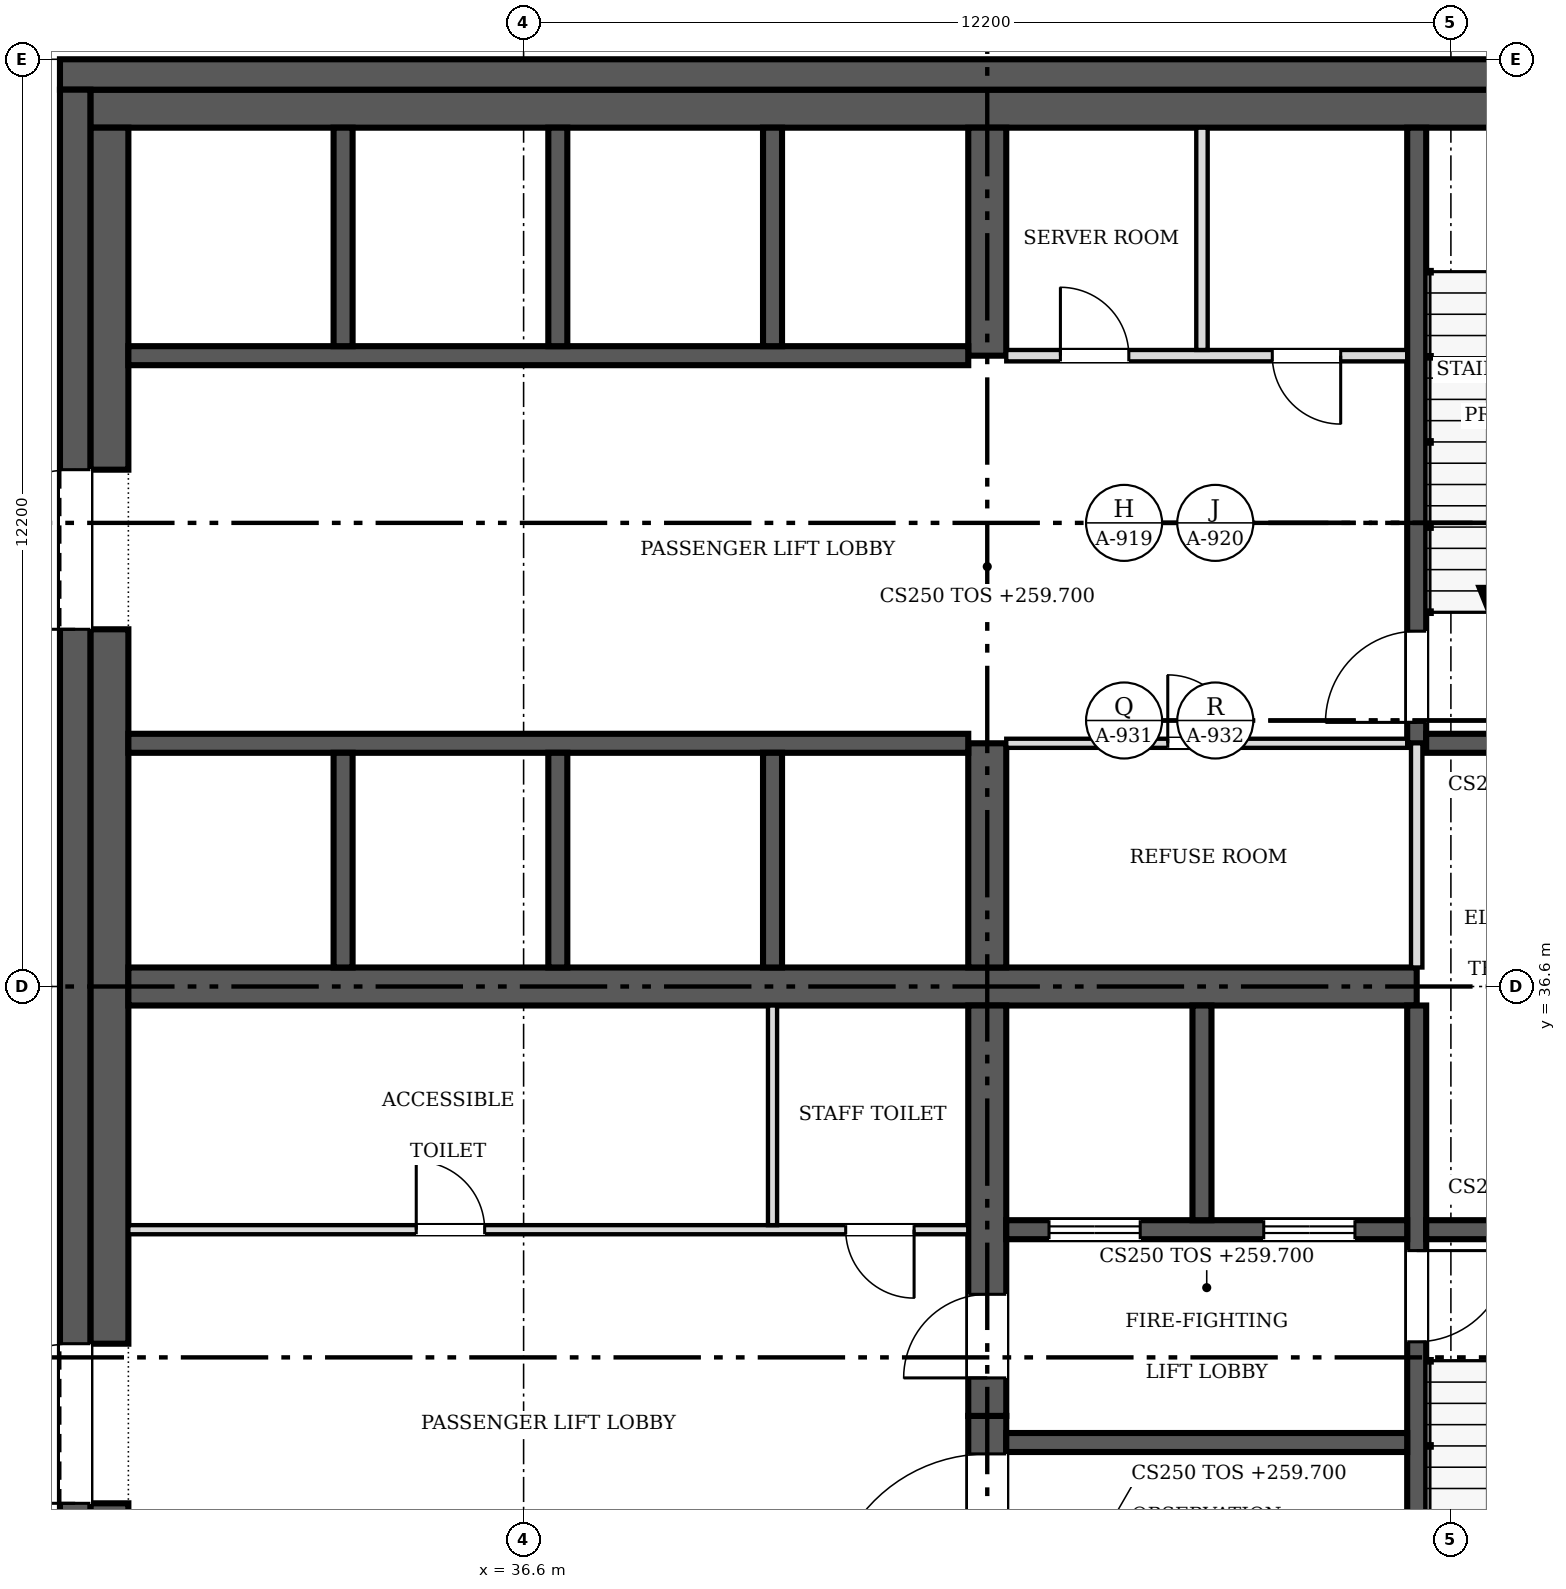
"""IFC4 building model, lengths in metres.
Left out: names, types, materials, properties, quantities, classifications, styles, units other than length and angle.
Written with IfcOpenShell. Run it as: python <this file> out.ifc"""

import sys

from ifc_helpers import new_model, si_unit, direction, frame, frame_2d, origin, place, context, subcontext, project, spatial, rectangle, extrude, source, transform, mapped, element, fill, save


model = new_model("IFC4")
c1 = context("Model", 3, precision=1e-05, world=origin(), true_north=direction((0.0, 1.0)))
c2 = subcontext(c1, "Body", "Model", "MODEL_VIEW")
j1 = project(units=[si_unit("LENGTHUNIT", "METRE"), si_unit("PLANEANGLEUNIT", "RADIAN")], contexts=[c1])
p1 = place(None, origin())
s1 = spatial("IfcSite", under=j1, at=p1, CompositionType="ELEMENT")
p2 = place(p1, origin())
s2 = spatial("IfcBuilding", under=s1, at=p2, CompositionType="ELEMENT")
p3 = place(p2, frame((0.0, 0.0, 259.7)))
s3 = spatial("IfcBuildingStorey", under=s2, at=p3, CompositionType="ELEMENT", Elevation=259.7)
p4 = place(p3, frame((30.7, 24.8, 0.0), z_axis=(0.0, 0.0, 1.0), x_axis=(0.0, 1.0, 0.0)))
e1 = element("IfcWall", 1, at=p4, inside=s3, PredefinedType="SHEAR", context=c2, shape_type="SweptSolid", body=[
    extrude(rectangle(XDim=23.6, YDim=0.4, at=frame_2d((11.8, 0.0))), origin(), (0.0, 0.0, 1.0), 6.0),
])
m1 = source(origin(), c2, "Body", "SweptSolid", [
    extrude(rectangle(XDim=2.1, YDim=2.4, at=frame_2d((1.05, 1.2))), frame((0.0, 0.21, 0.0), z_axis=(0.0, -1.0, 0.0), x_axis=(1.0, 0.0, 0.0)), (0.0, 0.0, 1.0), 0.42),
])
p5 = place(p4, frame((5.0, 0.0, 0.0)))
e2 = element("IfcOpeningElement", 2, at=p5, cuts=e1, PredefinedType="OPENING", context=c2, shape_type="MappedRepresentation", body=[
    mapped(m1, transform((0.0, 0.0, 0.0), scale=1.0)),
])
p6 = place(p4, frame((16.5, 0.0, 0.0)))
e3 = element("IfcOpeningElement", 3, at=p6, cuts=e1, PredefinedType="OPENING", context=c2, shape_type="MappedRepresentation", body=[
    mapped(m1, transform((0.0, 0.0, 0.0), scale=1.0)),
])
p7 = place(p3, frame((30.5, 48.6, 0.0), z_axis=(0.0, 0.0, 1.0), x_axis=(1.0, 0.0, 0.0)))
e4 = element("IfcWall", 4, at=p7, inside=s3, PredefinedType="SHEAR", context=c2, shape_type="SweptSolid", body=[
    extrude(rectangle(XDim=24.4, YDim=0.4, at=frame_2d((12.2, 0.0))), origin(), (0.0, 0.0, 1.0), 6.0),
])
p8 = place(p3, frame((30.9, 48.15, 0.0), z_axis=(0.0, 0.0, 1.0), x_axis=(1.0, 0.0, 0.0)))
e5 = element("IfcWall", 5, at=p8, inside=s3, PredefinedType="SOLIDWALL", context=c2, shape_type="SweptSolid", body=[
    extrude(rectangle(XDim=23.6, YDim=0.5, at=frame_2d((11.8, 0.0))), origin(), (0.0, 0.0, 1.0), 6.0),
])
p9 = place(p3, frame((31.15, 25.3, 0.0), z_axis=(0.0, 0.0, 1.0), x_axis=(0.0, 1.0, 0.0)))
e6 = element("IfcWall", 6, at=p9, inside=s3, PredefinedType="SOLIDWALL", context=c2, shape_type="SweptSolid", body=[
    extrude(rectangle(XDim=4.5, YDim=0.5, at=frame_2d((2.25, 0.0))), origin(), (0.0, 0.0, 1.0), 6.0),
])
p10 = place(p3, frame((31.15, 31.9, 0.0), z_axis=(0.0, 0.0, 1.0), x_axis=(0.0, 1.0, 0.0)))
e7 = element("IfcWall", 7, at=p10, inside=s3, PredefinedType="SOLIDWALL", context=c2, shape_type="SweptSolid", body=[
    extrude(rectangle(XDim=9.4, YDim=0.5, at=frame_2d((4.7, 0.0))), origin(), (0.0, 0.0, 1.0), 6.0),
])
p11 = place(p3, frame((31.15, 43.4, 0.0), z_axis=(0.0, 0.0, 1.0), x_axis=(0.0, 1.0, 0.0)))
e8 = element("IfcWall", 8, at=p11, inside=s3, PredefinedType="SOLIDWALL", context=c2, shape_type="SweptSolid", body=[
    extrude(rectangle(XDim=4.5, YDim=0.5, at=frame_2d((2.25, 0.0))), origin(), (0.0, 0.0, 1.0), 6.0),
])
p12 = place(p3, frame((31.4, 36.6, 0.0), z_axis=(0.0, 0.0, 1.0), x_axis=(1.0, 0.0, 0.0)))
e9 = element("IfcWall", 9, at=p12, inside=s3, PredefinedType="SHEAR", context=c2, shape_type="SweptSolid", body=[
    extrude(rectangle(XDim=16.95, YDim=0.5, at=frame_2d((8.475, 0.0))), origin(), (0.0, 0.0, 1.0), 6.0),
])
p13 = place(p3, frame((42.7, 25.3, 0.0), z_axis=(0.0, 0.0, 1.0), x_axis=(0.0, 1.0, 0.0)))
e10 = element("IfcWall", 10, at=p13, inside=s3, PredefinedType="SHEAR", context=c2, shape_type="SweptSolid", body=[
    extrude(rectangle(XDim=5.65, YDim=0.5, at=frame_2d((2.825, 0.0))), origin(), (0.0, 0.0, 1.0), 6.0),
])
m2 = source(origin(), c2, "Body", "SweptSolid", [
    extrude(rectangle(XDim=2.1, YDim=2.4, at=frame_2d((1.05, 1.2))), frame((0.0, 0.26, 0.0), z_axis=(0.0, -1.0, 0.0), x_axis=(1.0, 0.0, 0.0)), (0.0, 0.0, 1.0), 0.52),
])
p14 = place(p13, frame((3.05, 0.0, 0.0)))
e11 = element("IfcOpeningElement", 11, at=p14, cuts=e10, PredefinedType="OPENING", context=c2, shape_type="MappedRepresentation", body=[
    mapped(m2, transform((0.0, 0.0, 0.0), scale=1.0)),
])
p15 = place(p3, frame((42.7, 36.35, 0.0), z_axis=(0.0, 0.0, 1.0), x_axis=(0.0, -1.0, 0.0)))
e12 = element("IfcWall", 12, at=p15, inside=s3, PredefinedType="SHEAR", context=c2, shape_type="SweptSolid", body=[
    extrude(rectangle(XDim=5.4, YDim=0.5, at=frame_2d((2.7, 0.0))), origin(), (0.0, 0.0, 1.0), 6.0),
])
m3 = source(origin(), c2, "Body", "SweptSolid", [
    extrude(rectangle(XDim=1.1, YDim=2.1, at=frame_2d((0.55, 1.05))), frame((0.0, 0.26, 0.0), z_axis=(0.0, -1.0, 0.0), x_axis=(1.0, 0.0, 0.0)), (0.0, 0.0, 1.0), 0.52),
])
p16 = place(p15, frame((3.8, 0.0, 0.0)))
e13 = element("IfcOpeningElement", 13, at=p16, cuts=e12, PredefinedType="OPENING", context=c2, shape_type="MappedRepresentation", body=[
    mapped(m3, transform((0.0, 0.0, 0.0), scale=1.0)),
])
p17 = place(p3, frame((42.7, 36.85, 0.0), z_axis=(0.0, 0.0, 1.0), x_axis=(0.0, 1.0, 0.0)))
e14 = element("IfcWall", 14, at=p17, inside=s3, PredefinedType="SHEAR", context=c2, shape_type="SweptSolid", body=[
    extrude(rectangle(XDim=2.95, YDim=0.5, at=frame_2d((1.475, 0.0))), origin(), (0.0, 0.0, 1.0), 6.0),
])
p18 = place(p3, frame((42.7, 44.9, 0.0), z_axis=(0.0, 0.0, 1.0), x_axis=(0.0, 1.0, 0.0)))
e15 = element("IfcWall", 15, at=p18, inside=s3, PredefinedType="SHEAR", context=c2, shape_type="SweptSolid", body=[
    extrude(rectangle(XDim=3.0, YDim=0.5, at=frame_2d((1.5, 0.0))), origin(), (0.0, 0.0, 1.0), 6.0),
])
for number, where, z_axis, x_axis in (
    (16, (31.4, 39.8, 0.0), (0.0, 0.0, 1.0), (1.0, 0.0, 0.0)),
    (17, (31.4, 44.9, 0.0), (0.0, 0.0, 1.0), (1.0, 0.0, 0.0)),
):
    element("IfcWall", number, at=place(p3, frame(where, z_axis=z_axis, x_axis=x_axis)), inside=s3, PredefinedType="SOLIDWALL", context=c2, shape_type="SweptSolid", body=[
        extrude(rectangle(XDim=11.05, YDim=0.25, at=frame_2d((5.525, 0.0))), origin(), (0.0, 0.0, 1.0), 5.75),
    ])
p19 = place(p3, frame((48.35, 36.35, 0.0), z_axis=(0.0, 0.0, 1.0), x_axis=(0.0, -1.0, 0.0)))
e18 = element("IfcWall", 18, at=p19, inside=s3, PredefinedType="SOLIDWALL", context=c2, shape_type="SweptSolid", body=[
    extrude(rectangle(XDim=11.05, YDim=0.25, at=frame_2d((5.525, 0.0))), origin(), (0.0, 0.0, 1.0), 6.0),
])
m4 = source(origin(), c2, "Body", "SweptSolid", [
    extrude(rectangle(XDim=1.2, YDim=2.1, at=frame_2d((0.6, 1.05))), frame((0.0, 0.135, 0.0), z_axis=(0.0, -1.0, 0.0), x_axis=(1.0, 0.0, 0.0)), (0.0, 0.0, 1.0), 0.27),
])
p20 = place(p19, frame((3.225, 0.0, 0.0)))
e19 = element("IfcOpeningElement", 19, at=p20, cuts=e18, PredefinedType="OPENING", context=c2, shape_type="MappedRepresentation", body=[
    mapped(m4, transform((0.0, 0.0, 0.0), scale=1.0)),
])
p21 = place(p3, frame((48.225, 33.4, 0.0), z_axis=(0.0, 0.0, 1.0), x_axis=(-1.0, 0.0, 0.0)))
e20 = element("IfcWall", 20, at=p21, inside=s3, PredefinedType="SOLIDWALL", context=c2, shape_type="SweptSolid", body=[
    extrude(rectangle(XDim=5.275, YDim=0.25, at=frame_2d((2.638, 0.0))), origin(), (0.0, 0.0, 1.0), 6.0),
])
p22 = place(p21, frame((3.512, 0.0, 0.0)))
e21 = element("IfcOpeningElement", 21, at=p22, cuts=e20, PredefinedType="OPENING", context=c2, shape_type="MappedRepresentation", body=[
    mapped(m4, transform((0.0, 0.0, 0.0), scale=1.0)),
])
p23 = place(p21, frame((0.688, 0.0, 0.0)))
e22 = element("IfcOpeningElement", 22, at=p23, cuts=e20, PredefinedType="OPENING", context=c2, shape_type="MappedRepresentation", body=[
    mapped(m4, transform((0.0, 0.0, 0.0), scale=1.0)),
])
p24 = place(p3, frame((48.475, 33.4, 0.0), z_axis=(0.0, 0.0, 1.0), x_axis=(1.0, 0.0, 0.0)))
e23 = element("IfcWall", 23, at=p24, inside=s3, PredefinedType="SOLIDWALL", context=c2, shape_type="SweptSolid", body=[
    extrude(rectangle(XDim=3.525, YDim=0.25, at=frame_2d((1.762, 0.0))), origin(), (0.0, 0.0, 1.0), 6.0),
])
p25 = place(p3, frame((48.35, 47.9, 0.0), z_axis=(0.0, 0.0, 1.0), x_axis=(0.0, -1.0, 0.0)))
e24 = element("IfcWall", 24, at=p25, inside=s3, PredefinedType="SOLIDWALL", context=c2, shape_type="SweptSolid", body=[
    extrude(rectangle(XDim=8.1, YDim=0.25, at=frame_2d((4.05, 0.0))), origin(), (0.0, 0.0, 1.0), 6.0),
])
p26 = place(p25, frame((6.625, 0.0, 0.0)))
e25 = element("IfcOpeningElement", 25, at=p26, cuts=e24, PredefinedType="OPENING", context=c2, shape_type="MappedRepresentation", body=[
    mapped(m4, transform((0.0, 0.0, 0.0), scale=1.0)),
])
p27 = place(p3, frame((42.95, 30.6, 0.0), z_axis=(0.0, 0.0, 1.0), x_axis=(1.0, 0.0, 0.0)))
e26 = element("IfcWall", 26, at=p27, inside=s3, PredefinedType="SOLIDWALL", context=c2, shape_type="SweptSolid", body=[
    extrude(rectangle(XDim=5.275, YDim=0.25, at=frame_2d((2.638, 0.0))), origin(), (0.0, 0.0, 1.0), 6.0),
])
p28 = place(p3, frame((48.475, 39.8, 0.0), z_axis=(0.0, 0.0, 1.0), x_axis=(1.0, 0.0, 0.0)))
e27 = element("IfcWall", 27, at=p28, inside=s3, PredefinedType="SOLIDWALL", context=c2, shape_type="SweptSolid", body=[
    extrude(rectangle(XDim=3.4, YDim=0.25, at=frame_2d((1.7, 0.0))), origin(), (0.0, 0.0, 1.0), 6.0),
])
for number, where, z_axis, x_axis in (
    (28, (34.225, 36.85, 0.0), (0.0, 0.0, 1.0), (0.0, 1.0, 0.0)),
    (29, (37.05, 36.85, 0.0), (0.0, 0.0, 1.0), (0.0, 1.0, 0.0)),
    (30, (39.875, 36.85, 0.0), (0.0, 0.0, 1.0), (0.0, 1.0, 0.0)),
):
    element("IfcWall", number, at=place(p3, frame(where, z_axis=z_axis, x_axis=x_axis)), inside=s3, PredefinedType="SOLIDWALL", context=c2, shape_type="SweptSolid", body=[
        extrude(rectangle(XDim=2.825, YDim=0.25, at=frame_2d((1.413, 0.0))), origin(), (0.0, 0.0, 1.0), 5.75),
    ])
p29 = place(p3, frame((45.525, 33.525, 0.0), z_axis=(0.0, 0.0, 1.0), x_axis=(0.0, 1.0, 0.0)))
e31 = element("IfcWall", 31, at=p29, inside=s3, PredefinedType="SOLIDWALL", context=c2, shape_type="SweptSolid", body=[
    extrude(rectangle(XDim=2.825, YDim=0.25, at=frame_2d((1.413, 0.0))), origin(), (0.0, 0.0, 1.0), 6.0),
])
for number, where, z_axis, x_axis in (
    (32, (34.225, 45.025, 0.0), (0.0, 0.0, 1.0), (0.0, 1.0, 0.0)),
    (33, (37.05, 45.025, 0.0), (0.0, 0.0, 1.0), (0.0, 1.0, 0.0)),
    (34, (39.875, 45.025, 0.0), (0.0, 0.0, 1.0), (0.0, 1.0, 0.0)),
):
    element("IfcWall", number, at=place(p3, frame(where, z_axis=z_axis, x_axis=x_axis)), inside=s3, PredefinedType="SOLIDWALL", context=c2, shape_type="SweptSolid", body=[
        extrude(rectangle(XDim=2.875, YDim=0.25, at=frame_2d((1.438, 0.0))), origin(), (0.0, 0.0, 1.0), 5.75),
    ])
p30 = place(p3, frame((31.4, 33.4, 0.0), z_axis=(0.0, 0.0, 1.0), x_axis=(1.0, 0.0, 0.0)))
e35 = element("IfcWall", 35, at=p30, inside=s3, PredefinedType="PARTITIONING", context=c2, shape_type="SweptSolid", body=[
    extrude(rectangle(XDim=11.05, YDim=0.12, at=frame_2d((5.525, 0.0))), origin(), (0.0, 0.0, 1.0), 5.75),
])
m5 = source(origin(), c2, "Body", "SweptSolid", [
    extrude(rectangle(XDim=0.9, YDim=2.1, at=frame_2d((0.45, 1.05))), frame((0.0, 0.07, 0.0), z_axis=(0.0, -1.0, 0.0), x_axis=(1.0, 0.0, 0.0)), (0.0, 0.0, 1.0), 0.14),
])
p31 = place(p30, frame((3.788, 0.0, 0.0)))
e36 = element("IfcOpeningElement", 36, at=p31, cuts=e35, PredefinedType="OPENING", context=c2, shape_type="MappedRepresentation", body=[
    mapped(m5, transform((0.0, 0.0, 0.0), scale=1.0)),
])
p32 = place(p30, frame((9.438, 0.0, 0.0)))
e37 = element("IfcOpeningElement", 37, at=p32, cuts=e35, PredefinedType="OPENING", context=c2, shape_type="MappedRepresentation", body=[
    mapped(m5, transform((0.0, 0.0, 0.0), scale=1.0)),
])
p33 = place(p3, frame((48.225, 39.8, 0.0), z_axis=(0.0, 0.0, 1.0), x_axis=(-1.0, 0.0, 0.0)))
e38 = element("IfcWall", 38, at=p33, inside=s3, PredefinedType="PARTITIONING", context=c2, shape_type="SweptSolid", body=[
    extrude(rectangle(XDim=5.275, YDim=0.12, at=frame_2d((2.638, 0.0))), origin(), (0.0, 0.0, 1.0), 5.75),
])
p34 = place(p33, frame((2.25, 0.0, 0.0)))
e39 = element("IfcOpeningElement", 39, at=p34, cuts=e38, PredefinedType="OPENING", context=c2, shape_type="MappedRepresentation", body=[
    mapped(m5, transform((0.0, 0.0, 0.0), scale=1.0)),
])
p35 = place(p3, frame((42.95, 44.9, 0.0), z_axis=(0.0, 0.0, 1.0), x_axis=(1.0, 0.0, 0.0)))
e40 = element("IfcWall", 40, at=p35, inside=s3, PredefinedType="PARTITIONING", context=c2, shape_type="SweptSolid", body=[
    extrude(rectangle(XDim=5.275, YDim=0.15, at=frame_2d((2.638, 0.0))), origin(), (0.0, 0.0, 1.0), 5.75),
])
m6 = source(origin(), c2, "Body", "SweptSolid", [
    extrude(rectangle(XDim=0.9, YDim=2.1, at=frame_2d((0.45, 1.05))), frame((0.0, 0.085, 0.0), z_axis=(0.0, -1.0, 0.0), x_axis=(1.0, 0.0, 0.0)), (0.0, 0.0, 1.0), 0.17),
])
p36 = place(p35, frame((0.712, 0.0, 0.0)))
e41 = element("IfcOpeningElement", 41, at=p36, cuts=e40, PredefinedType="OPENING", context=c2, shape_type="MappedRepresentation", body=[
    mapped(m6, transform((0.0, 0.0, 0.0), scale=1.0)),
])
p37 = place(p35, frame((3.5, 0.0, 0.0)))
e42 = element("IfcOpeningElement", 42, at=p37, cuts=e40, PredefinedType="OPENING", context=c2, shape_type="MappedRepresentation", body=[
    mapped(m6, transform((0.0, 0.0, 0.0), scale=1.0)),
])
p38 = place(p3, frame((48.35, 36.85, 0.0), z_axis=(0.0, 0.0, 1.0), x_axis=(0.0, 1.0, 0.0)))
e43 = element("IfcWall", 43, at=p38, inside=s3, PredefinedType="PARTITIONING", context=c2, shape_type="SweptSolid", body=[
    extrude(rectangle(XDim=2.95, YDim=0.15, at=frame_2d((1.475, 0.0))), origin(), (0.0, 0.0, 1.0), 5.75),
])
p39 = place(p3, frame((39.875, 33.46, 0.0), z_axis=(0.0, 0.0, 1.0), x_axis=(0.0, 1.0, 0.0)))
e44 = element("IfcWall", 44, at=p39, inside=s3, PredefinedType="PARTITIONING", context=c2, shape_type="SweptSolid", body=[
    extrude(rectangle(XDim=2.89, YDim=0.12, at=frame_2d((1.445, 0.0))), origin(), (0.0, 0.0, 1.0), 5.75),
])
p40 = place(p3, frame((45.525, 44.975, 0.0), z_axis=(0.0, 0.0, 1.0), x_axis=(0.0, 1.0, 0.0)))
e45 = element("IfcWall", 45, at=p40, inside=s3, PredefinedType="PARTITIONING", context=c2, shape_type="SweptSolid", body=[
    extrude(rectangle(XDim=2.925, YDim=0.15, at=frame_2d((1.462, 0.0))), origin(), (0.0, 0.0, 1.0), 5.75),
])
m7 = source(origin(), c2, "Body", "SweptSolid", [
    extrude(rectangle(XDim=2.1, YDim=2.4, at=frame_2d((1.05, 1.2))), frame((0.0, 0.025, 0.0), z_axis=(0.0, -1.0, 0.0), x_axis=(1.0, 0.0, 0.0)), (0.0, 0.0, 1.0), 0.05),
])
p41 = place(p5, origin())
e46 = element("IfcDoor", 46, at=p41, inside=s3, OperationType="DOUBLE_DOOR_SINGLE_SWING", PredefinedType="DOOR", context=c2, shape_type="MappedRepresentation", body=[
    mapped(m7, transform((0.0, 0.0, 0.0), scale=1.0)),
])
fill(e2, e46)
p42 = place(p6, origin())
e47 = element("IfcDoor", 47, at=p42, inside=s3, OperationType="DOUBLE_DOOR_SINGLE_SWING", PredefinedType="DOOR", context=c2, shape_type="MappedRepresentation", body=[
    mapped(m7, transform((0.0, 0.0, 0.0), scale=1.0)),
])
fill(e3, e47)
p43 = place(p14, origin())
e48 = element("IfcDoor", 48, at=p43, inside=s3, OperationType="DOUBLE_DOOR_SINGLE_SWING", PredefinedType="DOOR", context=c2, shape_type="MappedRepresentation", body=[
    mapped(m7, transform((0.0, 0.0, 0.0), scale=1.0)),
])
fill(e11, e48)
m8 = source(origin(), c2, "Body", "SweptSolid", [
    extrude(rectangle(XDim=1.1, YDim=2.1, at=frame_2d((0.55, 1.05))), frame((0.0, 0.025, 0.0), z_axis=(0.0, -1.0, 0.0), x_axis=(1.0, 0.0, 0.0)), (0.0, 0.0, 1.0), 0.05),
])
p44 = place(p16, origin())
e49 = element("IfcDoor", 49, at=p44, inside=s3, OperationType="SINGLE_SWING_RIGHT", PredefinedType="DOOR", context=c2, shape_type="MappedRepresentation", body=[
    mapped(m8, transform((0.0, 0.0, 0.0), scale=1.0)),
])
fill(e13, e49)
m9 = source(origin(), c2, "Body", "SweptSolid", [
    extrude(rectangle(XDim=1.2, YDim=2.1, at=frame_2d((0.6, 1.05))), frame((0.0, 0.025, 0.0), z_axis=(0.0, -1.0, 0.0), x_axis=(1.0, 0.0, 0.0)), (0.0, 0.0, 1.0), 0.05),
])
p45 = place(p20, origin())
e50 = element("IfcDoor", 50, at=p45, inside=s3, OperationType="SINGLE_SWING_LEFT", PredefinedType="DOOR", context=c2, shape_type="MappedRepresentation", body=[
    mapped(m9, transform((0.0, 0.0, 0.0), scale=1.0)),
])
fill(e19, e50)
p46 = place(p22, origin())
e51 = element("IfcDoor", 51, at=p46, inside=s3, OperationType="DOUBLE_DOOR_SLIDING", PredefinedType="DOOR", context=c2, shape_type="MappedRepresentation", body=[
    mapped(m9, transform((0.0, 0.0, 0.0), scale=1.0)),
])
fill(e21, e51)
p47 = place(p23, origin())
e52 = element("IfcDoor", 52, at=p47, inside=s3, OperationType="DOUBLE_DOOR_SLIDING", PredefinedType="DOOR", context=c2, shape_type="MappedRepresentation", body=[
    mapped(m9, transform((0.0, 0.0, 0.0), scale=1.0)),
])
fill(e22, e52)
p48 = place(p26, origin())
e53 = element("IfcDoor", 53, at=p48, inside=s3, OperationType="SINGLE_SWING_RIGHT", PredefinedType="DOOR", context=c2, shape_type="MappedRepresentation", body=[
    mapped(m9, transform((0.0, 0.0, 0.0), scale=1.0)),
])
fill(e25, e53)
m10 = source(origin(), c2, "Body", "SweptSolid", [
    extrude(rectangle(XDim=0.9, YDim=2.1, at=frame_2d((0.45, 1.05))), frame((0.0, 0.025, 0.0), z_axis=(0.0, -1.0, 0.0), x_axis=(1.0, 0.0, 0.0)), (0.0, 0.0, 1.0), 0.05),
])
p49 = place(p31, origin())
e54 = element("IfcDoor", 54, at=p49, inside=s3, OperationType="SINGLE_SWING_LEFT", PredefinedType="DOOR", context=c2, shape_type="MappedRepresentation", body=[
    mapped(m10, transform((0.0, 0.0, 0.0), scale=1.0)),
])
fill(e36, e54)
p50 = place(p32, origin())
e55 = element("IfcDoor", 55, at=p50, inside=s3, OperationType="SINGLE_SWING_RIGHT", PredefinedType="DOOR", context=c2, shape_type="MappedRepresentation", body=[
    mapped(m10, transform((0.0, 0.0, 0.0), scale=1.0)),
])
fill(e37, e55)
p51 = place(p34, origin())
e56 = element("IfcDoor", 56, at=p51, inside=s3, OperationType="SINGLE_SWING_RIGHT", PredefinedType="DOOR", context=c2, shape_type="MappedRepresentation", body=[
    mapped(m10, transform((0.0, 0.0, 0.0), scale=1.0)),
])
fill(e39, e56)
p52 = place(p36, origin())
e57 = element("IfcDoor", 57, at=p52, inside=s3, OperationType="SINGLE_SWING_LEFT", PredefinedType="DOOR", context=c2, shape_type="MappedRepresentation", body=[
    mapped(m10, transform((0.0, 0.0, 0.0), scale=1.0)),
])
fill(e41, e57)
p53 = place(p37, origin())
e58 = element("IfcDoor", 58, at=p53, inside=s3, OperationType="SINGLE_SWING_RIGHT", PredefinedType="DOOR", context=c2, shape_type="MappedRepresentation", body=[
    mapped(m10, transform((0.0, 0.0, 0.0), scale=1.0)),
])
fill(e42, e58)
save(model, sys.argv[1])
